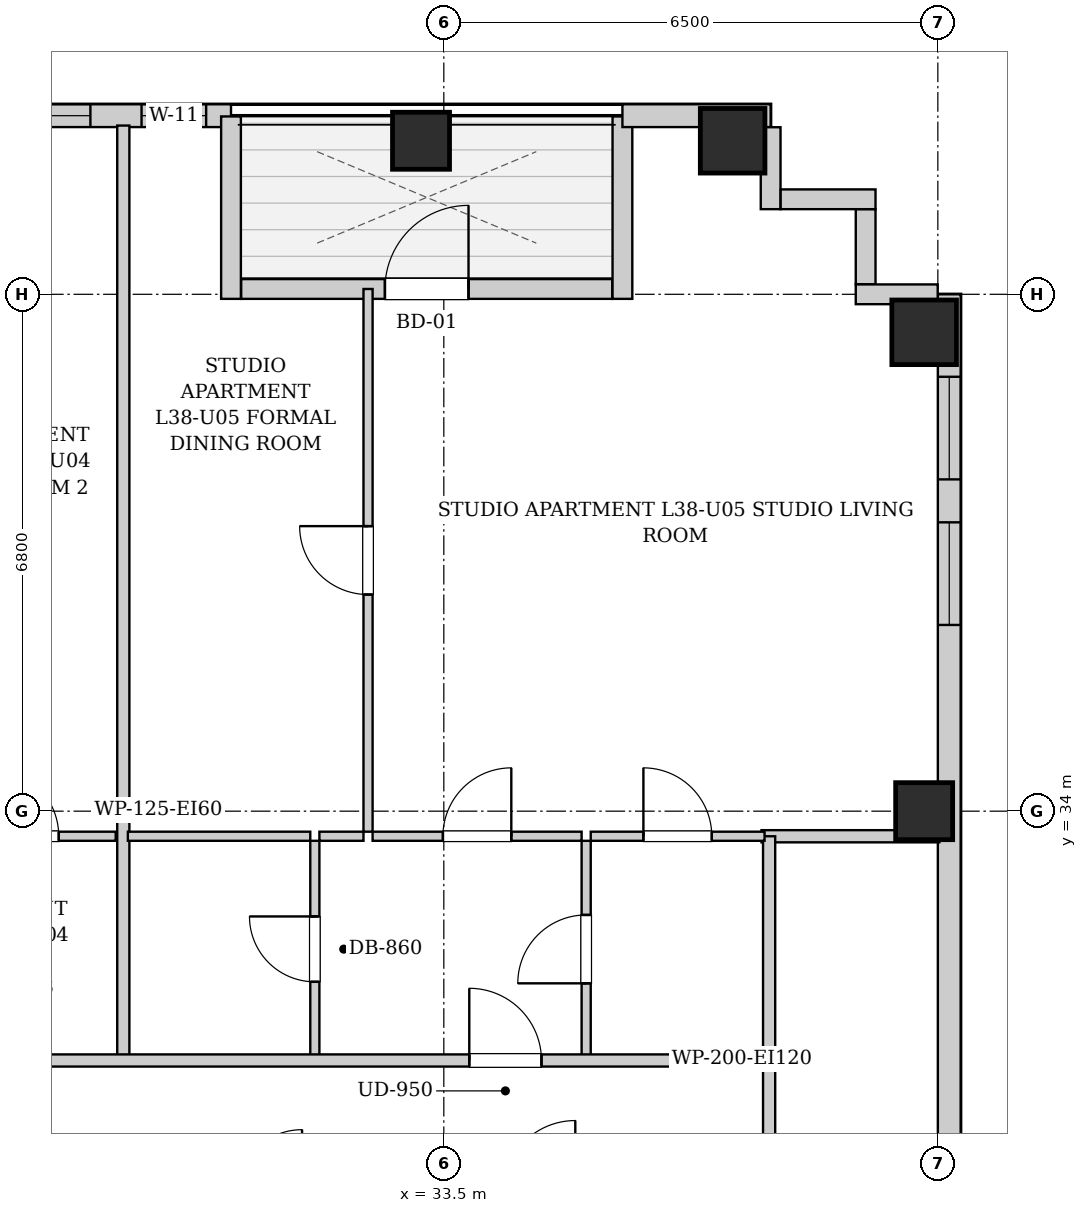
"""IFC4 building model, lengths in metres.
Left out: names, types, materials, properties, quantities, classifications, styles, units other than length and angle.
Written with IfcOpenShell. Run it as: python <this file> out.ifc"""

import sys

from ifc_helpers import new_model, si_unit, direction, frame, frame_2d, origin, origin_2d, place, context, subcontext, project, spatial, rectangle, extrude, element, fill, save


model = new_model("IFC4")
c1 = context("Model", 3, precision=1e-05, world=origin(), true_north=direction((0.0, 1.0)))
c2 = subcontext(c1, "Body", "Model", "MODEL_VIEW")
j1 = project(units=[si_unit("LENGTHUNIT", "METRE"), si_unit("PLANEANGLEUNIT", "RADIAN")], contexts=[c1])
p1 = place(None, origin())
s1 = spatial("IfcSite", under=j1, at=p1, CompositionType="ELEMENT")
p2 = place(p1, origin())
s2 = spatial("IfcBuilding", under=s1, at=p2, CompositionType="ELEMENT")
p3 = place(p2, frame((0.0, 0.0, 134.15)))
s3 = spatial("IfcBuildingStorey", under=s2, at=p3, CompositionType="ELEMENT", Elevation=134.15)
p4 = place(p3, frame((33.2, 42.82, 0.0), z_axis=(0.0, 0.0, 1.0), x_axis=(1.0, 0.0, 0.0)))
e1 = element("IfcColumn", 1, at=p4, inside=s3, PredefinedType="COLUMN", context=c2, shape_type="SweptSolid", body=[
    extrude(rectangle(XDim=0.75, YDim=0.75, at=origin_2d()), origin(), (0.0, 0.0, 1.0), 3.25),
])
p5 = place(p3, frame((37.3, 42.82, 0.0), z_axis=(0.0, 0.0, 1.0), x_axis=(1.0, 0.0, 0.0)))
e2 = element("IfcColumn", 2, at=p5, inside=s3, PredefinedType="COLUMN", context=c2, shape_type="SweptSolid", body=[
    extrude(rectangle(XDim=0.85, YDim=0.85, at=origin_2d()), origin(), (0.0, 0.0, 1.0), 3.25),
])
p6 = place(p3, frame((39.82, 34.0, 0.0), z_axis=(0.0, 0.0, 1.0), x_axis=(1.0, 0.0, 0.0)))
e3 = element("IfcColumn", 3, at=p6, inside=s3, PredefinedType="COLUMN", context=c2, shape_type="SweptSolid", body=[
    extrude(rectangle(XDim=0.75, YDim=0.75, at=origin_2d()), origin(), (0.0, 0.0, 1.0), 3.25),
])
p7 = place(p3, frame((39.82, 40.3, 0.0), z_axis=(0.0, 0.0, 1.0), x_axis=(1.0, 0.0, 0.0)))
e4 = element("IfcColumn", 4, at=p7, inside=s3, PredefinedType="COLUMN", context=c2, shape_type="SweptSolid", body=[
    extrude(rectangle(XDim=0.85, YDim=0.85, at=origin_2d()), origin(), (0.0, 0.0, 1.0), 3.25),
])
p8 = place(p3, frame((16.6, 43.15, 0.0), z_axis=(0.0, 0.0, 1.0), x_axis=(1.0, 0.0, 0.0)))
e5 = element("IfcWall", 5, at=p8, inside=s3, PredefinedType="SOLIDWALL", context=c2, shape_type="SweptSolid", body=[
    extrude(rectangle(XDim=14.1, YDim=0.3, at=frame_2d((7.05, 0.0))), origin(), (0.0, 0.0, 1.0), 2.99),
])
p9 = place(p8, frame((2.357, 0.0, 0.55)))
e6 = element("IfcOpeningElement", 6, at=p9, cuts=e5, PredefinedType="OPENING", context=c2, shape_type="SweptSolid", body=[
    extrude(rectangle(XDim=1.35, YDim=1.2, at=frame_2d((0.675, 0.6))), frame((0.0, 0.16, 0.0), z_axis=(0.0, -1.0, 0.0), x_axis=(1.0, 0.0, 0.0)), (0.0, 0.0, 1.0), 0.32),
])
p10 = place(p8, frame((4.55, 0.0, 0.55)))
e7 = element("IfcOpeningElement", 7, at=p10, cuts=e5, PredefinedType="OPENING", context=c2, shape_type="SweptSolid", body=[
    extrude(rectangle(XDim=1.35, YDim=1.2, at=frame_2d((0.675, 0.6))), frame((0.0, 0.16, 0.0), z_axis=(0.0, -1.0, 0.0), x_axis=(1.0, 0.0, 0.0)), (0.0, 0.0, 1.0), 0.32),
])
p11 = place(p8, frame((10.9, 0.0, 0.55)))
e8 = element("IfcOpeningElement", 8, at=p11, cuts=e5, PredefinedType="OPENING", context=c2, shape_type="SweptSolid", body=[
    extrude(rectangle(XDim=1.35, YDim=1.2, at=frame_2d((0.675, 0.6))), frame((0.0, 0.16, 0.0), z_axis=(0.0, -1.0, 0.0), x_axis=(1.0, 0.0, 0.0)), (0.0, 0.0, 1.0), 0.32),
])
p12 = place(p8, frame((12.923, 0.0, 0.55)))
e9 = element("IfcOpeningElement", 9, at=p12, cuts=e5, PredefinedType="OPENING", context=c2, shape_type="SweptSolid", body=[
    extrude(rectangle(XDim=0.85, YDim=1.2, at=frame_2d((0.425, 0.6))), frame((0.0, 0.16, 0.0), z_axis=(0.0, -1.0, 0.0), x_axis=(1.0, 0.0, 0.0)), (0.0, 0.0, 1.0), 0.32),
])
p13 = place(p3, frame((30.7, 43.14, 0.0), z_axis=(0.0, 0.0, 1.0), x_axis=(0.0, -1.0, 0.0)))
e10 = element("IfcWall", 10, at=p13, inside=s3, PredefinedType="SOLIDWALL", context=c2, shape_type="SweptSolid", body=[
    extrude(rectangle(XDim=2.4, YDim=0.26, at=frame_2d((1.2, 0.0))), origin(), (0.0, 0.0, 1.0), 2.99),
])
p14 = place(p3, frame((30.834, 40.87, 0.0), z_axis=(0.0, 0.0, 1.0), x_axis=(1.0, 0.0, 0.0)))
e11 = element("IfcWall", 11, at=p14, inside=s3, PredefinedType="SOLIDWALL", context=c2, shape_type="SweptSolid", body=[
    extrude(rectangle(XDim=4.882, YDim=0.26, at=frame_2d((2.441, 0.0))), origin(), (0.0, 0.0, 1.0), 2.99),
])
p15 = place(p14, frame((1.891, 0.0, 0.0)))
e12 = element("IfcOpeningElement", 12, at=p15, cuts=e11, PredefinedType="OPENING", context=c2, shape_type="SweptSolid", body=[
    extrude(rectangle(XDim=1.1, YDim=2.0, at=frame_2d((0.55, 1.0))), frame((0.0, 0.14, 0.0), z_axis=(0.0, -1.0, 0.0), x_axis=(1.0, 0.0, 0.0)), (0.0, 0.0, 1.0), 0.28),
])
p16 = place(p3, frame((35.85, 40.74, 0.0), z_axis=(0.0, 0.0, 1.0), x_axis=(0.0, 1.0, 0.0)))
e13 = element("IfcWall", 13, at=p16, inside=s3, PredefinedType="SOLIDWALL", context=c2, shape_type="SweptSolid", body=[
    extrude(rectangle(XDim=2.4, YDim=0.26, at=frame_2d((1.2, 0.0))), origin(), (0.0, 0.0, 1.0), 2.99),
])
p17 = place(p3, frame((35.85, 43.15, 0.0), z_axis=(0.0, 0.0, 1.0), x_axis=(1.0, 0.0, 0.0)))
e14 = element("IfcWall", 14, at=p17, inside=s3, PredefinedType="SOLIDWALL", context=c2, shape_type="SweptSolid", body=[
    extrude(rectangle(XDim=1.95, YDim=0.3, at=frame_2d((0.975, 0.0))), origin(), (0.0, 0.0, 1.0), 2.99),
])
p18 = place(p3, frame((40.15, 40.8, 0.0), z_axis=(0.0, 0.0, 1.0), x_axis=(0.0, -1.0, 0.0)))
e15 = element("IfcWall", 15, at=p18, inside=s3, PredefinedType="SOLIDWALL", context=c2, shape_type="SweptSolid", body=[
    extrude(rectangle(XDim=34.5, YDim=0.3, at=frame_2d((17.25, 0.0))), origin(), (0.0, 0.0, 1.0), 2.99),
])
p19 = place(p18, frame((31.725, 0.0, 0.55)))
e16 = element("IfcOpeningElement", 16, at=p19, cuts=e15, PredefinedType="OPENING", context=c2, shape_type="SweptSolid", body=[
    extrude(rectangle(XDim=1.35, YDim=1.2, at=frame_2d((0.675, 0.6))), frame((0.0, 0.16, 0.0), z_axis=(0.0, -1.0, 0.0), x_axis=(1.0, 0.0, 0.0)), (0.0, 0.0, 1.0), 0.32),
])
p20 = place(p18, frame((3.0, 0.0, 0.55)))
e17 = element("IfcOpeningElement", 17, at=p20, cuts=e15, PredefinedType="OPENING", context=c2, shape_type="SweptSolid", body=[
    extrude(rectangle(XDim=1.35, YDim=1.2, at=frame_2d((0.675, 0.6))), frame((0.0, 0.16, 0.0), z_axis=(0.0, -1.0, 0.0), x_axis=(1.0, 0.0, 0.0)), (0.0, 0.0, 1.0), 0.32),
])
p21 = place(p18, frame((1.085, 0.0, 0.55)))
e18 = element("IfcOpeningElement", 18, at=p21, cuts=e15, PredefinedType="OPENING", context=c2, shape_type="SweptSolid", body=[
    extrude(rectangle(XDim=1.35, YDim=1.2, at=frame_2d((0.675, 0.6))), frame((0.0, 0.16, 0.0), z_axis=(0.0, -1.0, 0.0), x_axis=(1.0, 0.0, 0.0)), (0.0, 0.0, 1.0), 0.32),
])
p22 = place(p18, frame((21.3, 0.0, 0.55)))
e19 = element("IfcOpeningElement", 19, at=p22, cuts=e15, PredefinedType="OPENING", context=c2, shape_type="SweptSolid", body=[
    extrude(rectangle(XDim=1.35, YDim=1.2, at=frame_2d((0.675, 0.6))), frame((0.0, 0.16, 0.0), z_axis=(0.0, -1.0, 0.0), x_axis=(1.0, 0.0, 0.0)), (0.0, 0.0, 1.0), 0.32),
])
p23 = place(p18, frame((22.91, 0.0, 0.55)))
e20 = element("IfcOpeningElement", 20, at=p23, cuts=e15, PredefinedType="OPENING", context=c2, shape_type="SweptSolid", body=[
    extrude(rectangle(XDim=1.35, YDim=1.2, at=frame_2d((0.675, 0.6))), frame((0.0, 0.16, 0.0), z_axis=(0.0, -1.0, 0.0), x_axis=(1.0, 0.0, 0.0)), (0.0, 0.0, 1.0), 0.32),
])
p24 = place(p18, frame((14.175, 0.0, 0.55)))
e21 = element("IfcOpeningElement", 21, at=p24, cuts=e15, PredefinedType="OPENING", context=c2, shape_type="SweptSolid", body=[
    extrude(rectangle(XDim=1.35, YDim=1.2, at=frame_2d((0.675, 0.6))), frame((0.0, 0.16, 0.0), z_axis=(0.0, -1.0, 0.0), x_axis=(1.0, 0.0, 0.0)), (0.0, 0.0, 1.0), 0.32),
])
p25 = place(p18, frame((12.335, 0.0, 0.55)))
e22 = element("IfcOpeningElement", 22, at=p25, cuts=e15, PredefinedType="OPENING", context=c2, shape_type="SweptSolid", body=[
    extrude(rectangle(XDim=1.35, YDim=1.2, at=frame_2d((0.675, 0.6))), frame((0.0, 0.16, 0.0), z_axis=(0.0, -1.0, 0.0), x_axis=(1.0, 0.0, 0.0)), (0.0, 0.0, 1.0), 0.32),
])
p26 = place(p3, frame((37.8, 42.998, 0.0), z_axis=(0.0, 0.0, 1.0), x_axis=(0.0, -1.0, 0.0)))
e23 = element("IfcWall", 23, at=p26, inside=s3, PredefinedType="SOLIDWALL", context=c2, shape_type="SweptSolid", body=[
    extrude(rectangle(XDim=1.078, YDim=0.26, at=frame_2d((0.539, 0.0))), origin(), (0.0, 0.0, 1.0), 2.99),
])
p27 = place(p3, frame((37.932, 42.05, 0.0), z_axis=(0.0, 0.0, 1.0), x_axis=(1.0, 0.0, 0.0)))
e24 = element("IfcWall", 24, at=p27, inside=s3, PredefinedType="SOLIDWALL", context=c2, shape_type="SweptSolid", body=[
    extrude(rectangle(XDim=1.248, YDim=0.26, at=frame_2d((0.624, 0.0))), origin(), (0.0, 0.0, 1.0), 2.99),
])
p28 = place(p3, frame((39.05, 41.918, 0.0), z_axis=(0.0, 0.0, 1.0), x_axis=(0.0, -1.0, 0.0)))
e25 = element("IfcWall", 25, at=p28, inside=s3, PredefinedType="SOLIDWALL", context=c2, shape_type="SweptSolid", body=[
    extrude(rectangle(XDim=0.986, YDim=0.26, at=frame_2d((0.493, 0.0))), origin(), (0.0, 0.0, 1.0), 2.99),
])
p29 = place(p3, frame((38.92, 40.8, 0.0), z_axis=(0.0, 0.0, 1.0), x_axis=(1.0, 0.0, 0.0)))
e26 = element("IfcWall", 26, at=p29, inside=s3, PredefinedType="SOLIDWALL", context=c2, shape_type="SweptSolid", body=[
    extrude(rectangle(XDim=1.078, YDim=0.26, at=frame_2d((0.539, 0.0))), origin(), (0.0, 0.0, 1.0), 2.99),
])
p30 = place(p3, frame((37.78, 28.98, 0.0), z_axis=(0.0, 0.0, 1.0), x_axis=(0.0, 1.0, 0.0)))
e27 = element("IfcWall", 27, at=p30, inside=s3, PredefinedType="PARTITIONING", context=c2, shape_type="SweptSolid", body=[
    extrude(rectangle(XDim=1.74, YDim=0.16, at=frame_2d((0.87, 0.0))), origin(), (0.0, 0.0, 1.0), 2.99),
])
p31 = place(p3, frame((26.785, 33.67, 0.0), z_axis=(0.0, 0.0, 1.0), x_axis=(1.0, 0.0, 0.0)))
e28 = element("IfcWall", 28, at=p31, inside=s3, PredefinedType="PARTITIONING", context=c2, shape_type="SweptSolid", body=[
    extrude(rectangle(XDim=2.398, YDim=0.12, at=frame_2d((1.199, 0.0))), origin(), (0.0, 0.0, 1.0), 2.99),
])
p32 = place(p31, frame((0.749, 0.0, 0.0)))
e29 = element("IfcOpeningElement", 29, at=p32, cuts=e28, PredefinedType="OPENING", context=c2, shape_type="SweptSolid", body=[
    extrude(rectangle(XDim=0.9, YDim=2.05, at=frame_2d((0.45, 1.025))), frame((0.0, 0.07, 0.0), z_axis=(0.0, -1.0, 0.0), x_axis=(1.0, 0.0, 0.0)), (0.0, 0.0, 1.0), 0.14),
])
p33 = place(p3, frame((37.68, 33.67, 0.0), z_axis=(0.0, 0.0, 1.0), x_axis=(1.0, 0.0, 0.0)))
e30 = element("IfcWall", 30, at=p33, inside=s3, PredefinedType="PARTITIONING", context=c2, shape_type="SweptSolid", body=[
    extrude(rectangle(XDim=2.34, YDim=0.16, at=frame_2d((1.17, 0.0))), origin(), (0.0, 0.0, 1.0), 2.99),
])
p34 = place(p3, frame((37.78, 30.76, 0.0), z_axis=(0.0, 0.0, 1.0), x_axis=(0.0, 1.0, 0.0)))
e31 = element("IfcWall", 31, at=p34, inside=s3, PredefinedType="PARTITIONING", context=c2, shape_type="SweptSolid", body=[
    extrude(rectangle(XDim=2.91, YDim=0.16, at=frame_2d((1.455, 0.0))), origin(), (0.0, 0.0, 1.0), 2.99),
])
p35 = place(p3, frame((29.283, 30.76, 0.0), z_axis=(0.0, 0.0, 1.0), x_axis=(0.0, 1.0, 0.0)))
e32 = element("IfcWall", 32, at=p35, inside=s3, PredefinedType="PARTITIONING", context=c2, shape_type="SweptSolid", body=[
    extrude(rectangle(XDim=12.26, YDim=0.16, at=frame_2d((6.13, 0.0))), origin(), (0.0, 0.0, 1.0), 2.99),
])
p36 = place(p3, frame((31.803, 30.76, 0.0), z_axis=(0.0, 0.0, 1.0), x_axis=(0.0, 1.0, 0.0)))
e33 = element("IfcWall", 33, at=p36, inside=s3, PredefinedType="PARTITIONING", context=c2, shape_type="SweptSolid", body=[
    extrude(rectangle(XDim=2.85, YDim=0.12, at=frame_2d((1.425, 0.0))), origin(), (0.0, 0.0, 1.0), 2.99),
])
p37 = place(p36, frame((0.995, 0.0, 0.0)))
e34 = element("IfcOpeningElement", 34, at=p37, cuts=e33, PredefinedType="OPENING", context=c2, shape_type="SweptSolid", body=[
    extrude(rectangle(XDim=0.86, YDim=2.05, at=frame_2d((0.43, 1.025))), frame((0.0, 0.07, 0.0), z_axis=(0.0, -1.0, 0.0), x_axis=(1.0, 0.0, 0.0)), (0.0, 0.0, 1.0), 0.14),
])
p38 = place(p3, frame((29.343, 33.67, 0.0), z_axis=(0.0, 0.0, 1.0), x_axis=(1.0, 0.0, 0.0)))
e35 = element("IfcWall", 35, at=p38, inside=s3, PredefinedType="PARTITIONING", context=c2, shape_type="SweptSolid", body=[
    extrude(rectangle(XDim=2.4, YDim=0.12, at=frame_2d((1.2, 0.0))), origin(), (0.0, 0.0, 1.0), 2.99),
])
p39 = place(p3, frame((35.373, 30.76, 0.0), z_axis=(0.0, 0.0, 1.0), x_axis=(0.0, 1.0, 0.0)))
e36 = element("IfcWall", 36, at=p39, inside=s3, PredefinedType="PARTITIONING", context=c2, shape_type="SweptSolid", body=[
    extrude(rectangle(XDim=2.85, YDim=0.12, at=frame_2d((1.425, 0.0))), origin(), (0.0, 0.0, 1.0), 2.99),
])
p40 = place(p39, frame((0.975, 0.0, 0.0)))
e37 = element("IfcOpeningElement", 37, at=p40, cuts=e36, PredefinedType="OPENING", context=c2, shape_type="SweptSolid", body=[
    extrude(rectangle(XDim=0.9, YDim=2.05, at=frame_2d((0.45, 1.025))), frame((0.0, 0.07, 0.0), z_axis=(0.0, -1.0, 0.0), x_axis=(1.0, 0.0, 0.0)), (0.0, 0.0, 1.0), 0.14),
])
p41 = place(p3, frame((31.863, 33.67, 0.0), z_axis=(0.0, 0.0, 1.0), x_axis=(1.0, 0.0, 0.0)))
e38 = element("IfcWall", 38, at=p41, inside=s3, PredefinedType="PARTITIONING", context=c2, shape_type="SweptSolid", body=[
    extrude(rectangle(XDim=0.58, YDim=0.12, at=frame_2d((0.29, 0.0))), origin(), (0.0, 0.0, 1.0), 2.99),
])
p42 = place(p3, frame((32.563, 33.67, 0.0), z_axis=(0.0, 0.0, 1.0), x_axis=(1.0, 0.0, 0.0)))
e39 = element("IfcWall", 39, at=p42, inside=s3, PredefinedType="PARTITIONING", context=c2, shape_type="SweptSolid", body=[
    extrude(rectangle(XDim=2.75, YDim=0.12, at=frame_2d((1.375, 0.0))), origin(), (0.0, 0.0, 1.0), 2.99),
])
p43 = place(p42, frame((0.925, 0.0, 0.0)))
e40 = element("IfcOpeningElement", 40, at=p43, cuts=e39, PredefinedType="OPENING", context=c2, shape_type="SweptSolid", body=[
    extrude(rectangle(XDim=0.9, YDim=2.05, at=frame_2d((0.45, 1.025))), frame((0.0, 0.07, 0.0), z_axis=(0.0, -1.0, 0.0), x_axis=(1.0, 0.0, 0.0)), (0.0, 0.0, 1.0), 0.14),
])
p44 = place(p3, frame((35.433, 33.67, 0.0), z_axis=(0.0, 0.0, 1.0), x_axis=(1.0, 0.0, 0.0)))
e41 = element("IfcWall", 41, at=p44, inside=s3, PredefinedType="PARTITIONING", context=c2, shape_type="SweptSolid", body=[
    extrude(rectangle(XDim=2.287, YDim=0.12, at=frame_2d((1.144, 0.0))), origin(), (0.0, 0.0, 1.0), 2.99),
])
p45 = place(p44, frame((0.693, 0.0, 0.0)))
e42 = element("IfcOpeningElement", 42, at=p45, cuts=e41, PredefinedType="OPENING", context=c2, shape_type="SweptSolid", body=[
    extrude(rectangle(XDim=0.9, YDim=2.05, at=frame_2d((0.45, 1.025))), frame((0.0, 0.07, 0.0), z_axis=(0.0, -1.0, 0.0), x_axis=(1.0, 0.0, 0.0)), (0.0, 0.0, 1.0), 0.14),
])
p46 = place(p3, frame((32.503, 33.73, 0.0), z_axis=(0.0, 0.0, 1.0), x_axis=(0.0, 1.0, 0.0)))
e43 = element("IfcWall", 43, at=p46, inside=s3, PredefinedType="PARTITIONING", context=c2, shape_type="SweptSolid", body=[
    extrude(rectangle(XDim=7.14, YDim=0.12, at=frame_2d((3.57, 0.0))), origin(), (0.0, 0.0, 1.0), 2.99),
])
p47 = place(p46, frame((3.12, 0.0, 0.0)))
e44 = element("IfcOpeningElement", 44, at=p47, cuts=e43, PredefinedType="OPENING", context=c2, shape_type="SweptSolid", body=[
    extrude(rectangle(XDim=0.9, YDim=2.05, at=frame_2d((0.45, 1.025))), frame((0.0, 0.07, 0.0), z_axis=(0.0, -1.0, 0.0), x_axis=(1.0, 0.0, 0.0)), (0.0, 0.0, 1.0), 0.14),
])
p48 = place(p3, frame((10.05, 30.72, 0.0), z_axis=(0.0, 0.0, 1.0), x_axis=(1.0, 0.0, 0.0)))
e45 = element("IfcWall", 45, at=p48, inside=s3, PredefinedType="PARTITIONING", context=c2, shape_type="SweptSolid", body=[
    extrude(rectangle(XDim=27.7, YDim=0.16, at=frame_2d((13.85, 0.0))), origin(), (0.0, 0.0, 1.0), 2.99),
])
p49 = place(p48, frame((4.165, 0.0, 0.0)))
e46 = element("IfcOpeningElement", 46, at=p49, cuts=e45, PredefinedType="OPENING", context=c2, shape_type="SweptSolid", body=[
    extrude(rectangle(XDim=0.95, YDim=2.1, at=frame_2d((0.475, 1.05))), frame((0.0, 0.09, 0.0), z_axis=(0.0, -1.0, 0.0), x_axis=(1.0, 0.0, 0.0)), (0.0, 0.0, 1.0), 0.18),
])
p50 = place(p48, frame((23.785, 0.0, 0.0)))
e47 = element("IfcOpeningElement", 47, at=p50, cuts=e45, PredefinedType="OPENING", context=c2, shape_type="SweptSolid", body=[
    extrude(rectangle(XDim=0.95, YDim=2.1, at=frame_2d((0.475, 1.05))), frame((0.0, 0.09, 0.0), z_axis=(0.0, -1.0, 0.0), x_axis=(1.0, 0.0, 0.0)), (0.0, 0.0, 1.0), 0.18),
])
p51 = place(p32, origin())
e48 = element("IfcDoor", 48, at=p51, inside=s3, OperationType="SINGLE_SWING_LEFT", PredefinedType="DOOR", context=c2, shape_type="SweptSolid", body=[
    extrude(rectangle(XDim=0.9, YDim=2.05, at=frame_2d((0.45, 1.025))), frame((0.0, 0.025, 0.0), z_axis=(0.0, -1.0, 0.0), x_axis=(1.0, 0.0, 0.0)), (0.0, 0.0, 1.0), 0.05),
])
fill(e29, e48)
p52 = place(p37, origin())
e49 = element("IfcDoor", 49, at=p52, inside=s3, OperationType="SINGLE_SWING_RIGHT", PredefinedType="DOOR", context=c2, shape_type="SweptSolid", body=[
    extrude(rectangle(XDim=0.86, YDim=2.05, at=frame_2d((0.43, 1.025))), frame((0.0, 0.025, 0.0), z_axis=(0.0, -1.0, 0.0), x_axis=(1.0, 0.0, 0.0)), (0.0, 0.0, 1.0), 0.05),
])
fill(e34, e49)
p53 = place(p40, origin())
e50 = element("IfcDoor", 50, at=p53, inside=s3, OperationType="SINGLE_SWING_LEFT", PredefinedType="DOOR", context=c2, shape_type="SweptSolid", body=[
    extrude(rectangle(XDim=0.9, YDim=2.05, at=frame_2d((0.45, 1.025))), frame((0.0, 0.025, 0.0), z_axis=(0.0, -1.0, 0.0), x_axis=(1.0, 0.0, 0.0)), (0.0, 0.0, 1.0), 0.05),
])
fill(e37, e50)
p54 = place(p43, origin())
e51 = element("IfcDoor", 51, at=p54, inside=s3, OperationType="SINGLE_SWING_RIGHT", PredefinedType="DOOR", context=c2, shape_type="SweptSolid", body=[
    extrude(rectangle(XDim=0.9, YDim=2.05, at=frame_2d((0.45, 1.025))), frame((0.0, 0.025, 0.0), z_axis=(0.0, -1.0, 0.0), x_axis=(1.0, 0.0, 0.0)), (0.0, 0.0, 1.0), 0.05),
])
fill(e40, e51)
p55 = place(p45, origin())
e52 = element("IfcDoor", 52, at=p55, inside=s3, OperationType="SINGLE_SWING_LEFT", PredefinedType="DOOR", context=c2, shape_type="SweptSolid", body=[
    extrude(rectangle(XDim=0.9, YDim=2.05, at=frame_2d((0.45, 1.025))), frame((0.0, 0.025, 0.0), z_axis=(0.0, -1.0, 0.0), x_axis=(1.0, 0.0, 0.0)), (0.0, 0.0, 1.0), 0.05),
])
fill(e42, e52)
p56 = place(p47, origin())
e53 = element("IfcDoor", 53, at=p56, inside=s3, OperationType="SINGLE_SWING_RIGHT", PredefinedType="DOOR", context=c2, shape_type="SweptSolid", body=[
    extrude(rectangle(XDim=0.9, YDim=2.05, at=frame_2d((0.45, 1.025))), frame((0.0, 0.025, 0.0), z_axis=(0.0, -1.0, 0.0), x_axis=(1.0, 0.0, 0.0)), (0.0, 0.0, 1.0), 0.05),
])
fill(e44, e53)
p57 = place(p50, origin())
e54 = element("IfcDoor", 54, at=p57, inside=s3, OperationType="SINGLE_SWING_LEFT", PredefinedType="DOOR", context=c2, shape_type="SweptSolid", body=[
    extrude(rectangle(XDim=0.95, YDim=2.1, at=frame_2d((0.475, 1.05))), frame((0.0, 0.025, 0.0), z_axis=(0.0, -1.0, 0.0), x_axis=(1.0, 0.0, 0.0)), (0.0, 0.0, 1.0), 0.05),
])
fill(e47, e54)
p58 = place(p15, origin())
e55 = element("IfcDoor", 55, at=p58, inside=s3, OperationType="SINGLE_SWING_RIGHT", PredefinedType="DOOR", context=c2, shape_type="SweptSolid", body=[
    extrude(rectangle(XDim=1.1, YDim=2.0, at=frame_2d((0.55, 1.0))), frame((0.0, 0.025, 0.0), z_axis=(0.0, -1.0, 0.0), x_axis=(1.0, 0.0, 0.0)), (0.0, 0.0, 1.0), 0.05),
])
fill(e12, e55)
p59 = place(p11, origin())
e56 = element("IfcWindow", 56, at=p59, inside=s3, PartitioningType="SINGLE_PANEL", PredefinedType="WINDOW", context=c2, shape_type="SweptSolid", body=[
    extrude(rectangle(XDim=1.35, YDim=1.2, at=frame_2d((0.675, 0.6))), frame((0.0, 0.03, 0.0), z_axis=(0.0, -1.0, 0.0), x_axis=(1.0, 0.0, 0.0)), (0.0, 0.0, 1.0), 0.06),
])
fill(e8, e56)
p60 = place(p12, origin())
e57 = element("IfcWindow", 57, at=p60, inside=s3, PartitioningType="SINGLE_PANEL", PredefinedType="WINDOW", context=c2, shape_type="SweptSolid", body=[
    extrude(rectangle(XDim=0.85, YDim=1.2, at=frame_2d((0.425, 0.6))), frame((0.0, 0.03, 0.0), z_axis=(0.0, -1.0, 0.0), x_axis=(1.0, 0.0, 0.0)), (0.0, 0.0, 1.0), 0.06),
])
fill(e9, e57)
p61 = place(p20, origin())
e58 = element("IfcWindow", 58, at=p61, inside=s3, PartitioningType="SINGLE_PANEL", PredefinedType="WINDOW", context=c2, shape_type="SweptSolid", body=[
    extrude(rectangle(XDim=1.35, YDim=1.2, at=frame_2d((0.675, 0.6))), frame((0.0, 0.03, 0.0), z_axis=(0.0, -1.0, 0.0), x_axis=(1.0, 0.0, 0.0)), (0.0, 0.0, 1.0), 0.06),
])
fill(e17, e58)
p62 = place(p21, origin())
e59 = element("IfcWindow", 59, at=p62, inside=s3, PartitioningType="SINGLE_PANEL", PredefinedType="WINDOW", context=c2, shape_type="SweptSolid", body=[
    extrude(rectangle(XDim=1.35, YDim=1.2, at=frame_2d((0.675, 0.6))), frame((0.0, 0.03, 0.0), z_axis=(0.0, -1.0, 0.0), x_axis=(1.0, 0.0, 0.0)), (0.0, 0.0, 1.0), 0.06),
])
fill(e18, e59)
save(model, sys.argv[1])
